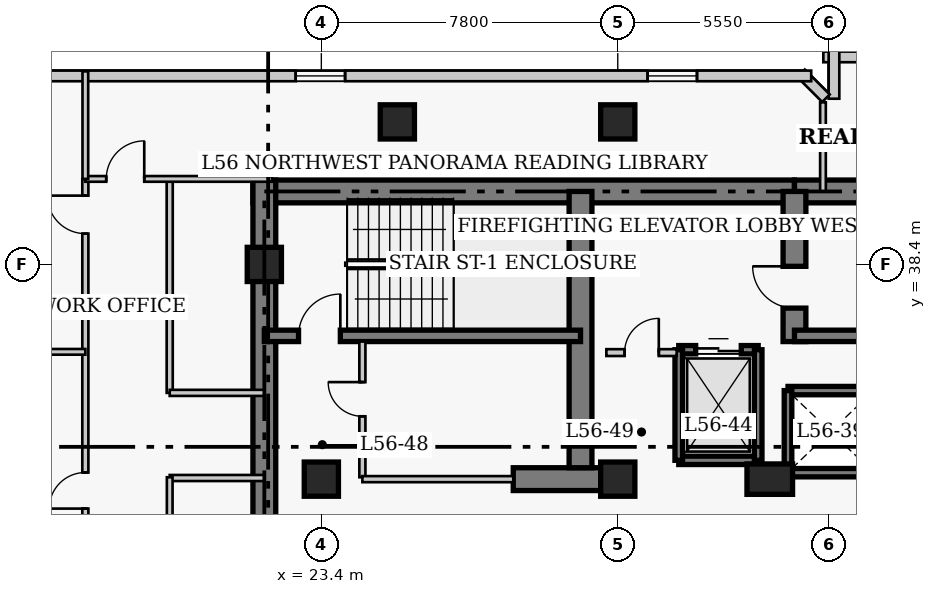
"""IFC4 building model, lengths in metres.
Left out: names, types, materials, properties, quantities, classifications, styles, units other than length and angle.
Written with IfcOpenShell. Run it as: python <this file> out.ifc"""

import sys

from ifc_helpers import new_model, si_unit, direction, frame, frame_2d, origin, origin_2d, place, context, subcontext, project, spatial, rectangle, extrude, element, fill, save


model = new_model("IFC4")
c1 = context("Model", 3, precision=1e-05, world=origin(), true_north=direction((0.0, 1.0)))
c2 = subcontext(c1, "Body", "Model", "MODEL_VIEW")
j1 = project(units=[si_unit("LENGTHUNIT", "METRE"), si_unit("PLANEANGLEUNIT", "RADIAN")], contexts=[c1])
p1 = place(None, origin())
s1 = spatial("IfcSite", under=j1, at=p1, CompositionType="ELEMENT")
p2 = place(p1, origin())
s2 = spatial("IfcBuilding", under=s1, at=p2, CompositionType="ELEMENT")
p3 = place(p2, frame((0.0, 0.0, 224.1)))
s3 = spatial("IfcBuildingStorey", under=s2, at=p3, CompositionType="ELEMENT", Elevation=224.1)
p4 = place(p3, frame((21.6, 40.32, 0.0), z_axis=(0.0, 0.0, 1.0), x_axis=(1.0, 0.0, 0.0)))
e1 = element("IfcWall", 1, at=p4, inside=s3, PredefinedType="SHEAR", context=c2, shape_type="SweptSolid", body=[
    extrude(rectangle(XDim=14.25, YDim=0.6, at=frame_2d((7.125, 0.0))), origin(), (0.0, 0.0, 1.0), 3.9),
])
p5 = place(p3, frame((35.85, 40.32, 0.0), z_axis=(0.0, 0.0, 1.0), x_axis=(1.0, 0.0, 0.0)))
e2 = element("IfcWall", 2, at=p5, inside=s3, PredefinedType="SHEAR", context=c2, shape_type="SweptSolid", body=[
    extrude(rectangle(XDim=12.6, YDim=0.6, at=frame_2d((6.3, 0.0))), origin(), (0.0, 0.0, 1.0), 3.9),
])
p6 = place(p3, frame((21.9, 27.05, 0.0), z_axis=(0.0, 0.0, 1.0), x_axis=(0.0, 1.0, 0.0)))
e3 = element("IfcWall", 3, at=p6, inside=s3, PredefinedType="SHEAR", context=c2, shape_type="SweptSolid", body=[
    extrude(rectangle(XDim=13.57, YDim=0.6, at=frame_2d((6.785, 0.0))), origin(), (0.0, 0.0, 1.0), 3.9),
])
p7 = place(p3, frame((28.45, 32.75, 0.0), z_axis=(0.0, 0.0, 1.0), x_axis=(1.0, 0.0, 0.0)))
e4 = element("IfcWall", 4, at=p7, inside=s3, PredefinedType="SHEAR", context=c2, shape_type="SweptSolid", body=[
    extrude(rectangle(XDim=2.4, YDim=0.6, at=frame_2d((1.2, 0.0))), origin(), (0.0, 0.0, 1.0), 3.9),
])
p8 = place(p3, frame((30.22, 33.05, 0.0), z_axis=(0.0, 0.0, 1.0), x_axis=(0.0, 1.0, 0.0)))
e5 = element("IfcWall", 5, at=p8, inside=s3, PredefinedType="SHEAR", context=c2, shape_type="SweptSolid", body=[
    extrude(rectangle(XDim=7.27, YDim=0.6, at=frame_2d((3.635, 0.0))), origin(), (0.0, 0.0, 1.0), 3.9),
])
p9 = place(p3, frame((35.85, 36.37, 0.0), z_axis=(0.0, 0.0, 1.0), x_axis=(0.0, 1.0, 0.0)))
e6 = element("IfcWall", 6, at=p9, inside=s3, PredefinedType="SHEAR", context=c2, shape_type="SweptSolid", body=[
    extrude(rectangle(XDim=3.95, YDim=0.6, at=frame_2d((1.975, 0.0))), origin(), (0.0, 0.0, 1.0), 3.9),
])
p10 = place(p9, frame((0.88, 0.0, 0.0)))
e7 = element("IfcOpeningElement", 7, at=p10, cuts=e6, PredefinedType="OPENING", context=c2, shape_type="SweptSolid", body=[
    extrude(rectangle(XDim=1.1, YDim=2.15, at=frame_2d((0.55, 1.075))), frame((0.0, 0.31, 0.0), z_axis=(0.0, -1.0, 0.0), x_axis=(1.0, 0.0, 0.0)), (0.0, 0.0, 1.0), 0.62),
])
p11 = place(p3, frame((21.9, 36.52, 0.0), z_axis=(0.0, 0.0, 1.0), x_axis=(1.0, 0.0, 0.0)))
e8 = element("IfcWall", 8, at=p11, inside=s3, PredefinedType="SHEAR", context=c2, shape_type="SweptSolid", body=[
    extrude(rectangle(XDim=8.32, YDim=0.3, at=frame_2d((4.16, 0.0))), origin(), (0.0, 0.0, 1.0), 3.9),
])
p12 = place(p11, frame((0.9, 0.0, 0.0)))
e9 = element("IfcOpeningElement", 9, at=p12, cuts=e8, PredefinedType="OPENING", context=c2, shape_type="SweptSolid", body=[
    extrude(rectangle(XDim=1.1, YDim=2.15, at=frame_2d((0.55, 1.075))), frame((0.0, 0.16, 0.0), z_axis=(0.0, -1.0, 0.0), x_axis=(1.0, 0.0, 0.0)), (0.0, 0.0, 1.0), 0.32),
])
p13 = place(p3, frame((35.85, 36.52, 0.0), z_axis=(0.0, 0.0, 1.0), x_axis=(1.0, 0.0, 0.0)))
e10 = element("IfcWall", 10, at=p13, inside=s3, PredefinedType="SHEAR", context=c2, shape_type="SweptSolid", body=[
    extrude(rectangle(XDim=8.33, YDim=0.3, at=frame_2d((4.165, 0.0))), origin(), (0.0, 0.0, 1.0), 3.9),
])
for number, where, z_axis, x_axis in (
    (11, (21.9, 38.4, 0.0), (0.0, 0.0, 1.0), (1.0, 0.0, 0.0)),
    (12, (23.4, 32.75, 0.0), (0.0, 0.0, 1.0), (1.0, 0.0, 0.0)),
    (13, (31.2, 32.75, 0.0), (0.0, 0.0, 1.0), (1.0, 0.0, 0.0)),
):
    element("IfcColumn", number, at=place(p3, frame(where, z_axis=z_axis, x_axis=x_axis)), inside=s3, PredefinedType="COLUMN", context=c2, shape_type="SweptSolid", body=[
        extrude(rectangle(XDim=0.9, YDim=0.9, at=origin_2d()), origin(), (0.0, 0.0, 1.0), 3.9),
    ])
p14 = place(p3, frame((35.2, 32.75, 0.0), z_axis=(0.0, 0.0, 1.0), x_axis=(1.0, 0.0, 0.0)))
e14 = element("IfcColumn", 14, at=p14, inside=s3, PredefinedType="COLUMN", context=c2, shape_type="SweptSolid", body=[
    extrude(rectangle(XDim=1.2, YDim=0.8, at=origin_2d()), origin(), (0.0, 0.0, 1.0), 3.9),
])
for number, where, z_axis, x_axis in (
    (15, (25.4, 42.15, 0.0), (0.0, 0.0, 1.0), (1.0, 0.0, 0.0)),
    (16, (31.2, 42.15, 0.0), (0.0, 0.0, 1.0), (1.0, 0.0, 0.0)),
):
    element("IfcColumn", number, at=place(p3, frame(where, z_axis=z_axis, x_axis=x_axis)), inside=s3, PredefinedType="COLUMN", context=c2, shape_type="SweptSolid", body=[
        extrude(rectangle(XDim=0.9, YDim=0.9, at=origin_2d()), origin(), (0.0, 0.0, 1.0), 3.9),
    ])
p15 = place(p3, frame((41.39, 43.86, 0.0), z_axis=(0.0, 0.0, 1.0), x_axis=(-1.0, 0.0, 0.0)))
e17 = element("IfcWall", 17, at=p15, inside=s3, PredefinedType="SOLIDWALL", context=c2, shape_type="SweptSolid", body=[
    extrude(rectangle(XDim=4.78, YDim=0.28, at=frame_2d((2.39, 0.0))), origin(), (0.0, 0.0, 1.0), 3.65),
])
p16 = place(p15, frame((1.74, 0.0, 0.85)))
e18 = element("IfcOpeningElement", 18, at=p16, cuts=e17, PredefinedType="OPENING", context=c2, shape_type="SweptSolid", body=[
    extrude(rectangle(XDim=1.3, YDim=1.7, at=frame_2d((0.65, 0.85))), frame((0.0, 0.15, 0.0), z_axis=(0.0, -1.0, 0.0), x_axis=(1.0, 0.0, 0.0)), (0.0, 0.0, 1.0), 0.3),
])
p17 = place(p3, frame((36.89, 44.14, 0.0), z_axis=(0.0, 0.0, 1.0), x_axis=(0.0, -1.0, 0.0)))
e19 = element("IfcWall", 19, at=p17, inside=s3, PredefinedType="SOLIDWALL", context=c2, shape_type="SweptSolid", body=[
    extrude(rectangle(XDim=1.38, YDim=0.28, at=frame_2d((0.69, 0.0))), origin(), (0.0, 0.0, 1.0), 3.65),
])
p18 = place(p3, frame((36.679, 42.773, 0.0), z_axis=(0.0, 0.0, 1.0), x_axis=(-0.707106781187, 0.707106781187, 0.0)))
e20 = element("IfcWall", 20, at=p18, inside=s3, PredefinedType="SOLIDWALL", context=c2, shape_type="SweptSolid", body=[
    extrude(rectangle(XDim=0.928, YDim=0.28, at=frame_2d((0.464, 0.0))), origin(), (0.0, 0.0, 1.0), 3.65),
])
p19 = place(p3, frame((36.29, 43.36, 0.0), z_axis=(0.0, 0.0, 1.0), x_axis=(-1.0, 0.0, 0.0)))
e21 = element("IfcWall", 21, at=p19, inside=s3, PredefinedType="SOLIDWALL", context=c2, shape_type="SweptSolid", body=[
    extrude(rectangle(XDim=25.83, YDim=0.28, at=frame_2d((12.915, 0.0))), origin(), (0.0, 0.0, 1.0), 3.65),
])
p20 = place(p19, frame((3.005, 0.0, 0.85)))
e22 = element("IfcOpeningElement", 22, at=p20, cuts=e21, PredefinedType="OPENING", context=c2, shape_type="SweptSolid", body=[
    extrude(rectangle(XDim=1.3, YDim=1.7, at=frame_2d((0.65, 0.85))), frame((0.0, 0.15, 0.0), z_axis=(0.0, -1.0, 0.0), x_axis=(1.0, 0.0, 0.0)), (0.0, 0.0, 1.0), 0.3),
])
p21 = place(p19, frame((12.265, 0.0, 0.85)))
e23 = element("IfcOpeningElement", 23, at=p21, cuts=e21, PredefinedType="OPENING", context=c2, shape_type="SweptSolid", body=[
    extrude(rectangle(XDim=1.3, YDim=1.7, at=frame_2d((0.65, 0.85))), frame((0.0, 0.15, 0.0), z_axis=(0.0, -1.0, 0.0), x_axis=(1.0, 0.0, 0.0)), (0.0, 0.0, 1.0), 0.3),
])
p22 = place(p19, frame((20.875, 0.0, 0.85)))
e24 = element("IfcOpeningElement", 24, at=p22, cuts=e21, PredefinedType="OPENING", context=c2, shape_type="SweptSolid", body=[
    extrude(rectangle(XDim=1.3, YDim=1.7, at=frame_2d((0.65, 0.85))), frame((0.0, 0.15, 0.0), z_axis=(0.0, -1.0, 0.0), x_axis=(1.0, 0.0, 0.0)), (0.0, 0.0, 1.0), 0.3),
])
for number, where, z_axis, x_axis in (
    (25, (35.68, 35.08, 0.0), (0.0, 0.0, 1.0), (1.0, 0.0, 0.0)),
    (26, (35.68, 32.92, 0.0), (0.0, 0.0, 1.0), (1.0, 0.0, 0.0)),
):
    element("IfcWall", number, at=place(p3, frame(where, z_axis=z_axis, x_axis=x_axis)), inside=s3, PredefinedType="SHEAR", context=c2, shape_type="SweptSolid", body=[
        extrude(rectangle(XDim=2.32, YDim=0.22, at=frame_2d((1.16, 0.0))), origin(), (0.0, 0.0, 1.0), 3.9),
    ])
p23 = place(p3, frame((35.68, 32.92, 0.0), z_axis=(0.0, 0.0, 1.0), x_axis=(0.0, 1.0, 0.0)))
e27 = element("IfcWall", 27, at=p23, inside=s3, PredefinedType="SHEAR", context=c2, shape_type="SweptSolid", body=[
    extrude(rectangle(XDim=2.16, YDim=0.2, at=frame_2d((1.08, 0.0))), origin(), (0.0, 0.0, 1.0), 3.9),
])
p24 = place(p3, frame((32.805, 36.155, 0.0), z_axis=(0.0, 0.0, 1.0), x_axis=(1.0, 0.0, 0.0)))
e28 = element("IfcWall", 28, at=p24, inside=s3, PredefinedType="SHEAR", context=c2, shape_type="SweptSolid", body=[
    extrude(rectangle(XDim=2.09, YDim=0.22, at=frame_2d((1.045, 0.0))), origin(), (0.0, 0.0, 1.0), 3.9),
])
p25 = place(p24, frame((0.445, 0.0, 0.0)))
e29 = element("IfcOpeningElement", 29, at=p25, cuts=e28, PredefinedType="OPENING", context=c2, shape_type="SweptSolid", body=[
    extrude(rectangle(XDim=1.2, YDim=2.15, at=frame_2d((0.6, 1.075))), frame((0.0, 0.12, 0.0), z_axis=(0.0, -1.0, 0.0), x_axis=(1.0, 0.0, 0.0)), (0.0, 0.0, 1.0), 0.24),
])
p26 = place(p3, frame((32.805, 33.245, 0.0), z_axis=(0.0, 0.0, 1.0), x_axis=(1.0, 0.0, 0.0)))
e30 = element("IfcWall", 30, at=p26, inside=s3, PredefinedType="SHEAR", context=c2, shape_type="SweptSolid", body=[
    extrude(rectangle(XDim=2.09, YDim=0.22, at=frame_2d((1.045, 0.0))), origin(), (0.0, 0.0, 1.0), 3.9),
])
for number, where, z_axis, x_axis in (
    (31, (32.805, 33.245, 0.0), (0.0, 0.0, 1.0), (0.0, 1.0, 0.0)),
    (32, (34.895, 33.245, 0.0), (0.0, 0.0, 1.0), (0.0, 1.0, 0.0)),
):
    element("IfcWall", number, at=place(p3, frame(where, z_axis=z_axis, x_axis=x_axis)), inside=s3, PredefinedType="SHEAR", context=c2, shape_type="SweptSolid", body=[
        extrude(rectangle(XDim=2.91, YDim=0.2, at=frame_2d((1.455, 0.0))), origin(), (0.0, 0.0, 1.0), 3.9),
    ])
p27 = place(p3, frame((30.9, 36.08, 0.0), z_axis=(0.0, 0.0, 1.0), x_axis=(1.0, 0.0, 0.0)))
e33 = element("IfcWall", 33, at=p27, inside=s3, PredefinedType="PARTITIONING", context=c2, shape_type="SweptSolid", body=[
    extrude(rectangle(XDim=1.85, YDim=0.18, at=frame_2d((0.925, 0.0))), origin(), (0.0, 0.0, 1.0), 3.65),
])
p28 = place(p27, frame((0.48, 0.0, 0.0)))
e34 = element("IfcOpeningElement", 34, at=p28, cuts=e33, PredefinedType="OPENING", context=c2, shape_type="SweptSolid", body=[
    extrude(rectangle(XDim=0.9, YDim=2.15, at=frame_2d((0.45, 1.075))), frame((0.0, 0.1, 0.0), z_axis=(0.0, -1.0, 0.0), x_axis=(1.0, 0.0, 0.0)), (0.0, 0.0, 1.0), 0.2),
])
p29 = place(p3, frame((24.48, 32.8, 0.0), z_axis=(0.0, 0.0, 1.0), x_axis=(0.0, 1.0, 0.0)))
e35 = element("IfcWall", 35, at=p29, inside=s3, PredefinedType="PARTITIONING", context=c2, shape_type="SweptSolid", body=[
    extrude(rectangle(XDim=3.57, YDim=0.16, at=frame_2d((1.785, 0.0))), origin(), (0.0, 0.0, 1.0), 3.65),
])
p30 = place(p29, frame((1.604, 0.0, 0.0)))
e36 = element("IfcOpeningElement", 36, at=p30, cuts=e35, PredefinedType="OPENING", context=c2, shape_type="SweptSolid", body=[
    extrude(rectangle(XDim=0.9, YDim=2.1, at=frame_2d((0.45, 1.05))), frame((0.0, 0.09, 0.0), z_axis=(0.0, -1.0, 0.0), x_axis=(1.0, 0.0, 0.0)), (0.0, 0.0, 1.0), 0.18),
])
p31 = place(p3, frame((24.48, 32.75, 0.0), z_axis=(0.0, 0.0, 1.0), x_axis=(1.0, 0.0, 0.0)))
e37 = element("IfcWall", 37, at=p31, inside=s3, PredefinedType="PARTITIONING", context=c2, shape_type="SweptSolid", body=[
    extrude(rectangle(XDim=3.97, YDim=0.16, at=frame_2d((1.985, 0.0))), origin(), (0.0, 0.0, 1.0), 3.65),
])
p32 = place(p3, frame((17.19, 7.55, 0.0), z_axis=(0.0, 0.0, 1.0), x_axis=(0.0, 1.0, 0.0)))
e38 = element("IfcWall", 38, at=p32, inside=s3, PredefinedType="PARTITIONING", context=c2, shape_type="SweptSolid", body=[
    extrude(rectangle(XDim=33.1, YDim=0.16, at=frame_2d((16.55, 0.0))), origin(), (0.0, 0.0, 1.0), 3.65),
])
p33 = place(p32, frame((1.35, 0.0, 0.0)))
e39 = element("IfcOpeningElement", 39, at=p33, cuts=e38, PredefinedType="OPENING", context=c2, shape_type="SweptSolid", body=[
    extrude(rectangle(XDim=0.95, YDim=2.1, at=frame_2d((0.475, 1.05))), frame((0.0, 0.09, 0.0), z_axis=(0.0, -1.0, 0.0), x_axis=(1.0, 0.0, 0.0)), (0.0, 0.0, 1.0), 0.18),
])
p34 = place(p32, frame((7.575, 0.0, 0.0)))
e40 = element("IfcOpeningElement", 40, at=p34, cuts=e38, PredefinedType="OPENING", context=c2, shape_type="SweptSolid", body=[
    extrude(rectangle(XDim=0.95, YDim=2.1, at=frame_2d((0.475, 1.05))), frame((0.0, 0.09, 0.0), z_axis=(0.0, -1.0, 0.0), x_axis=(1.0, 0.0, 0.0)), (0.0, 0.0, 1.0), 0.18),
])
p35 = place(p32, frame((16.375, 0.0, 0.0)))
e41 = element("IfcOpeningElement", 41, at=p35, cuts=e38, PredefinedType="OPENING", context=c2, shape_type="SweptSolid", body=[
    extrude(rectangle(XDim=0.95, YDim=2.1, at=frame_2d((0.475, 1.05))), frame((0.0, 0.09, 0.0), z_axis=(0.0, -1.0, 0.0), x_axis=(1.0, 0.0, 0.0)), (0.0, 0.0, 1.0), 0.18),
])
p36 = place(p32, frame((24.425, 0.0, 0.0)))
e42 = element("IfcOpeningElement", 42, at=p36, cuts=e38, PredefinedType="OPENING", context=c2, shape_type="SweptSolid", body=[
    extrude(rectangle(XDim=0.95, YDim=2.1, at=frame_2d((0.475, 1.05))), frame((0.0, 0.09, 0.0), z_axis=(0.0, -1.0, 0.0), x_axis=(1.0, 0.0, 0.0)), (0.0, 0.0, 1.0), 0.18),
])
p37 = place(p32, frame((31.66, 0.0, 0.0)))
e43 = element("IfcOpeningElement", 43, at=p37, cuts=e38, PredefinedType="OPENING", context=c2, shape_type="SweptSolid", body=[
    extrude(rectangle(XDim=1.0, YDim=2.15, at=frame_2d((0.5, 1.075))), frame((0.0, 0.09, 0.0), z_axis=(0.0, -1.0, 0.0), x_axis=(1.0, 0.0, 0.0)), (0.0, 0.0, 1.0), 0.18),
])
p38 = place(p3, frame((19.41, 35.02, 0.0), z_axis=(0.0, 0.0, 1.0), x_axis=(0.0, 1.0, 0.0)))
e44 = element("IfcWall", 44, at=p38, inside=s3, PredefinedType="PARTITIONING", context=c2, shape_type="SweptSolid", body=[
    extrude(rectangle(XDim=5.63, YDim=0.16, at=frame_2d((2.815, 0.0))), origin(), (0.0, 0.0, 1.0), 3.65),
])
for number, where, z_axis, x_axis in (
    (45, (19.41, 35.02, 0.0), (0.0, 0.0, 1.0), (1.0, 0.0, 0.0)),
    (46, (19.41, 32.78, 0.0), (0.0, 0.0, 1.0), (1.0, 0.0, 0.0)),
):
    element("IfcWall", number, at=place(p3, frame(where, z_axis=z_axis, x_axis=x_axis)), inside=s3, PredefinedType="PARTITIONING", context=c2, shape_type="SweptSolid", body=[
        extrude(rectangle(XDim=2.49, YDim=0.16, at=frame_2d((1.245, 0.0))), origin(), (0.0, 0.0, 1.0), 3.65),
    ])
p39 = place(p3, frame((17.19, 40.65, 0.0), z_axis=(0.0, 0.0, 1.0), x_axis=(1.0, 0.0, 0.0)))
e47 = element("IfcWall", 47, at=p39, inside=s3, PredefinedType="PARTITIONING", context=c2, shape_type="SweptSolid", body=[
    extrude(rectangle(XDim=4.91, YDim=0.15, at=frame_2d((2.455, 0.0))), origin(), (0.0, 0.0, 1.0), 3.65),
])
p40 = place(p39, frame((0.55, 0.0, 0.0)))
e48 = element("IfcOpeningElement", 48, at=p40, cuts=e47, PredefinedType="OPENING", context=c2, shape_type="SweptSolid", body=[
    extrude(rectangle(XDim=1.0, YDim=2.15, at=frame_2d((0.5, 1.075))), frame((0.0, 0.085, 0.0), z_axis=(0.0, -1.0, 0.0), x_axis=(1.0, 0.0, 0.0)), (0.0, 0.0, 1.0), 0.17),
])
p41 = place(p3, frame((19.41, 18.86, 0.0), z_axis=(0.0, 0.0, 1.0), x_axis=(0.0, 1.0, 0.0)))
e49 = element("IfcWall", 49, at=p41, inside=s3, PredefinedType="PARTITIONING", context=c2, shape_type="SweptSolid", body=[
    extrude(rectangle(XDim=13.94, YDim=0.15, at=frame_2d((6.97, 0.0))), origin(), (0.0, 0.0, 1.0), 3.246),
])
p42 = place(p3, frame((17.19, 40.65, 0.0), z_axis=(0.0, 0.0, 1.0), x_axis=(0.0, 1.0, 0.0)))
e50 = element("IfcWall", 50, at=p42, inside=s3, PredefinedType="PARTITIONING", context=c2, shape_type="SweptSolid", body=[
    extrude(rectangle(XDim=2.83, YDim=0.15, at=frame_2d((1.415, 0.0))), origin(), (0.0, 0.0, 1.0), 3.65),
])
p43 = place(p3, frame((36.6, 40.32, 0.0), z_axis=(0.0, 0.0, 1.0), x_axis=(0.0, 1.0, 0.0)))
e51 = element("IfcWall", 51, at=p43, inside=s3, PredefinedType="PARTITIONING", context=c2, shape_type="SweptSolid", body=[
    extrude(rectangle(XDim=2.345, YDim=0.15, at=frame_2d((1.172, 0.0))), origin(), (0.0, 0.0, 1.0), 3.65),
])
p44 = place(p3, frame((14.45, 36.1, 0.0), z_axis=(0.0, 0.0, 1.0), x_axis=(1.0, 0.0, 0.0)))
e52 = element("IfcWall", 52, at=p44, inside=s3, PredefinedType="PARTITIONING", context=c2, shape_type="SweptSolid", body=[
    extrude(rectangle(XDim=2.74, YDim=0.15, at=frame_2d((1.37, 0.0))), origin(), (0.0, 0.0, 1.0), 3.65),
])
p45 = place(p20, origin())
e53 = element("IfcWindow", 53, at=p45, inside=s3, PartitioningType="SINGLE_PANEL", PredefinedType="WINDOW", context=c2, shape_type="SweptSolid", body=[
    extrude(rectangle(XDim=1.3, YDim=1.7, at=frame_2d((0.65, 0.85))), frame((0.0, 0.03, 0.0), z_axis=(0.0, -1.0, 0.0), x_axis=(1.0, 0.0, 0.0)), (0.0, 0.0, 1.0), 0.06),
])
fill(e22, e53)
p46 = place(p21, origin())
e54 = element("IfcWindow", 54, at=p46, inside=s3, PartitioningType="SINGLE_PANEL", PredefinedType="WINDOW", context=c2, shape_type="SweptSolid", body=[
    extrude(rectangle(XDim=1.3, YDim=1.7, at=frame_2d((0.65, 0.85))), frame((0.0, 0.03, 0.0), z_axis=(0.0, -1.0, 0.0), x_axis=(1.0, 0.0, 0.0)), (0.0, 0.0, 1.0), 0.06),
])
fill(e23, e54)
p47 = place(p25, origin())
e55 = element("IfcDoor", 55, at=p47, inside=s3, OperationType="DOUBLE_DOOR_SLIDING", PredefinedType="DOOR", context=c2, shape_type="SweptSolid", body=[
    extrude(rectangle(XDim=1.2, YDim=2.15, at=frame_2d((0.6, 1.075))), frame((0.0, 0.025, 0.0), z_axis=(0.0, -1.0, 0.0), x_axis=(1.0, 0.0, 0.0)), (0.0, 0.0, 1.0), 0.05),
])
fill(e29, e55)
p48 = place(p28, origin())
e56 = element("IfcDoor", 56, at=p48, inside=s3, OperationType="SINGLE_SWING_RIGHT", PredefinedType="DOOR", context=c2, shape_type="SweptSolid", body=[
    extrude(rectangle(XDim=0.9, YDim=2.15, at=frame_2d((0.45, 1.075))), frame((0.0, 0.025, 0.0), z_axis=(0.0, -1.0, 0.0), x_axis=(1.0, 0.0, 0.0)), (0.0, 0.0, 1.0), 0.05),
])
fill(e34, e56)
p49 = place(p30, origin())
e57 = element("IfcDoor", 57, at=p49, inside=s3, OperationType="SINGLE_SWING_RIGHT", PredefinedType="DOOR", context=c2, shape_type="SweptSolid", body=[
    extrude(rectangle(XDim=0.9, YDim=2.1, at=frame_2d((0.45, 1.05))), frame((0.0, 0.025, 0.0), z_axis=(0.0, -1.0, 0.0), x_axis=(1.0, 0.0, 0.0)), (0.0, 0.0, 1.0), 0.05),
])
fill(e36, e57)
p50 = place(p40, origin())
e58 = element("IfcDoor", 58, at=p50, inside=s3, OperationType="SINGLE_SWING_RIGHT", PredefinedType="DOOR", context=c2, shape_type="SweptSolid", body=[
    extrude(rectangle(XDim=1.0, YDim=2.15, at=frame_2d((0.5, 1.075))), frame((0.0, 0.025, 0.0), z_axis=(0.0, -1.0, 0.0), x_axis=(1.0, 0.0, 0.0)), (0.0, 0.0, 1.0), 0.05),
])
fill(e48, e58)
p51 = place(p36, origin())
e59 = element("IfcDoor", 59, at=p51, inside=s3, OperationType="SINGLE_SWING_LEFT", PredefinedType="DOOR", context=c2, shape_type="SweptSolid", body=[
    extrude(rectangle(XDim=0.95, YDim=2.1, at=frame_2d((0.475, 1.05))), frame((0.0, 0.025, 0.0), z_axis=(0.0, -1.0, 0.0), x_axis=(1.0, 0.0, 0.0)), (0.0, 0.0, 1.0), 0.05),
])
fill(e42, e59)
p52 = place(p37, origin())
e60 = element("IfcDoor", 60, at=p52, inside=s3, OperationType="SINGLE_SWING_RIGHT", PredefinedType="DOOR", context=c2, shape_type="SweptSolid", body=[
    extrude(rectangle(XDim=1.0, YDim=2.15, at=frame_2d((0.5, 1.075))), frame((0.0, 0.025, 0.0), z_axis=(0.0, -1.0, 0.0), x_axis=(1.0, 0.0, 0.0)), (0.0, 0.0, 1.0), 0.05),
])
fill(e43, e60)
p53 = place(p12, origin())
e61 = element("IfcDoor", 61, at=p53, inside=s3, OperationType="SINGLE_SWING_RIGHT", PredefinedType="DOOR", context=c2, shape_type="SweptSolid", body=[
    extrude(rectangle(XDim=1.1, YDim=2.15, at=frame_2d((0.55, 1.075))), frame((0.0, 0.025, 0.0), z_axis=(0.0, -1.0, 0.0), x_axis=(1.0, 0.0, 0.0)), (0.0, 0.0, 1.0), 0.05),
])
fill(e9, e61)
p54 = place(p10, origin())
e62 = element("IfcDoor", 62, at=p54, inside=s3, OperationType="SINGLE_SWING_RIGHT", PredefinedType="DOOR", context=c2, shape_type="SweptSolid", body=[
    extrude(rectangle(XDim=1.1, YDim=2.15, at=frame_2d((0.55, 1.075))), frame((0.0, 0.025, 0.0), z_axis=(0.0, -1.0, 0.0), x_axis=(1.0, 0.0, 0.0)), (0.0, 0.0, 1.0), 0.05),
])
fill(e7, e62)
save(model, sys.argv[1])
